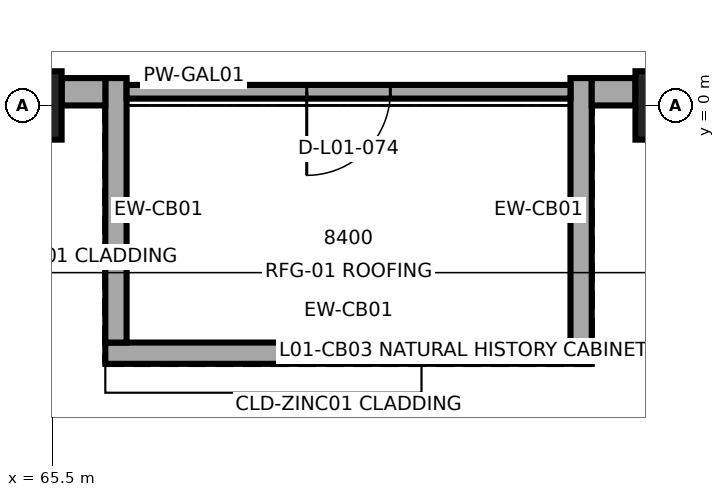
"""IFC4 building model, lengths in metres.
Left out: names, types, materials, properties, quantities, classifications, styles, units other than length and angle.
Written with IfcOpenShell. Run it as: python <this file> out.ifc"""

import sys

from ifc_helpers import new_model, si_unit, direction, frame, frame_2d, origin, origin_2d, place, context, subcontext, project, spatial, rectangle, extrude, element, fill, save


model = new_model("IFC4")
c1 = context("Model", 3, precision=1e-05, world=origin(), true_north=direction((0.0, 1.0)))
c2 = subcontext(c1, "Body", "Model", "MODEL_VIEW")
j1 = project(units=[si_unit("LENGTHUNIT", "METRE"), si_unit("PLANEANGLEUNIT", "RADIAN")], contexts=[c1])
p1 = place(None, origin())
s1 = spatial("IfcSite", under=j1, at=p1, CompositionType="ELEMENT")
p2 = place(p1, origin())
s2 = spatial("IfcBuilding", under=s1, at=p2, CompositionType="ELEMENT")
p3 = place(p2, frame((0.0, 0.0, 8.4)))
s3 = spatial("IfcBuildingStorey", under=s2, at=p3, CompositionType="ELEMENT", Elevation=8.4)
for number, where, z_axis, x_axis in (
    (1, (65.2, 0.0, 0.0), (0.0, 0.0, 1.0), (1.0, 0.0, 0.0)),
    (2, (73.6, 0.0, 0.0), (0.0, 0.0, 1.0), (1.0, 0.0, 0.0)),
):
    element("IfcColumn", number, at=place(p3, frame(where, z_axis=z_axis, x_axis=x_axis)), inside=s3, PredefinedType="COLUMN", context=c2, shape_type="SweptSolid", body=[
        extrude(rectangle(XDim=0.85, YDim=0.9, at=origin_2d()), origin(), (0.0, 0.0, 1.0), 4.5),
    ])
p4 = place(p3, frame((66.2, -3.26, 0.0), z_axis=(0.0, 0.0, 1.0), x_axis=(1.0, 0.0, 0.0)))
e3 = element("IfcWall", 3, at=p4, inside=s3, PredefinedType="SOLIDWALL", context=c2, shape_type="SweptSolid", body=[
    extrude(rectangle(XDim=6.4, YDim=0.28, at=frame_2d((3.2, 0.0))), origin(), (0.0, 0.0, 1.0), 2.99),
])
for number, where, z_axis, x_axis in (
    (4, (66.34, 0.36, 0.0), (0.0, 0.0, 1.0), (0.0, -1.0, 0.0)),
    (5, (72.46, -3.12, 0.0), (0.0, 0.0, 1.0), (0.0, 1.0, 0.0)),
):
    element("IfcWall", number, at=place(p3, frame(where, z_axis=z_axis, x_axis=x_axis)), inside=s3, PredefinedType="SOLIDWALL", context=c2, shape_type="SweptSolid", body=[
        extrude(rectangle(XDim=3.48, YDim=0.28, at=frame_2d((1.74, 0.0))), origin(), (0.0, 0.0, 1.0), 2.99),
    ])
for number, where, z_axis, x_axis in (
    (6, (65.625, 0.18, 0.0), (0.0, 0.0, 1.0), (1.0, 0.0, 0.0)),
    (7, (72.6, 0.18, 0.0), (0.0, 0.0, 1.0), (1.0, 0.0, 0.0)),
):
    element("IfcWall", number, at=place(p3, frame(where, z_axis=z_axis, x_axis=x_axis)), inside=s3, PredefinedType="SOLIDWALL", context=c2, shape_type="SweptSolid", body=[
        extrude(rectangle(XDim=0.575, YDim=0.36, at=frame_2d((0.288, 0.0))), origin(), (0.0, 0.0, 1.0), 3.335),
    ])
p5 = place(p3, frame((66.48, 0.18, 0.0), z_axis=(0.0, 0.0, 1.0), x_axis=(1.0, 0.0, 0.0)))
e8 = element("IfcWall", 8, at=p5, inside=s3, PredefinedType="PARTITIONING", context=c2, shape_type="SweptSolid", body=[
    extrude(rectangle(XDim=5.84, YDim=0.18, at=frame_2d((2.92, 0.0))), origin(), (0.0, 0.0, 1.0), 2.99),
])
p6 = place(p5, frame((2.37, 0.0, 0.0)))
e9 = element("IfcOpeningElement", 9, at=p6, cuts=e8, PredefinedType="OPENING", context=c2, shape_type="SweptSolid", body=[
    extrude(rectangle(XDim=1.1, YDim=2.2, at=frame_2d((0.55, 1.1))), frame((0.0, 0.1, 0.0), z_axis=(0.0, -1.0, 0.0), x_axis=(1.0, 0.0, 0.0)), (0.0, 0.0, 1.0), 0.2),
])
p7 = place(p6, origin())
e10 = element("IfcDoor", 10, at=p7, inside=s3, OperationType="SINGLE_SWING_RIGHT", PredefinedType="DOOR", context=c2, shape_type="SweptSolid", body=[
    extrude(rectangle(XDim=1.1, YDim=2.2, at=frame_2d((0.55, 1.1))), frame((0.0, 0.025, 0.0), z_axis=(0.0, -1.0, 0.0), x_axis=(1.0, 0.0, 0.0)), (0.0, 0.0, 1.0), 0.05),
])
fill(e9, e10)
save(model, sys.argv[1])
